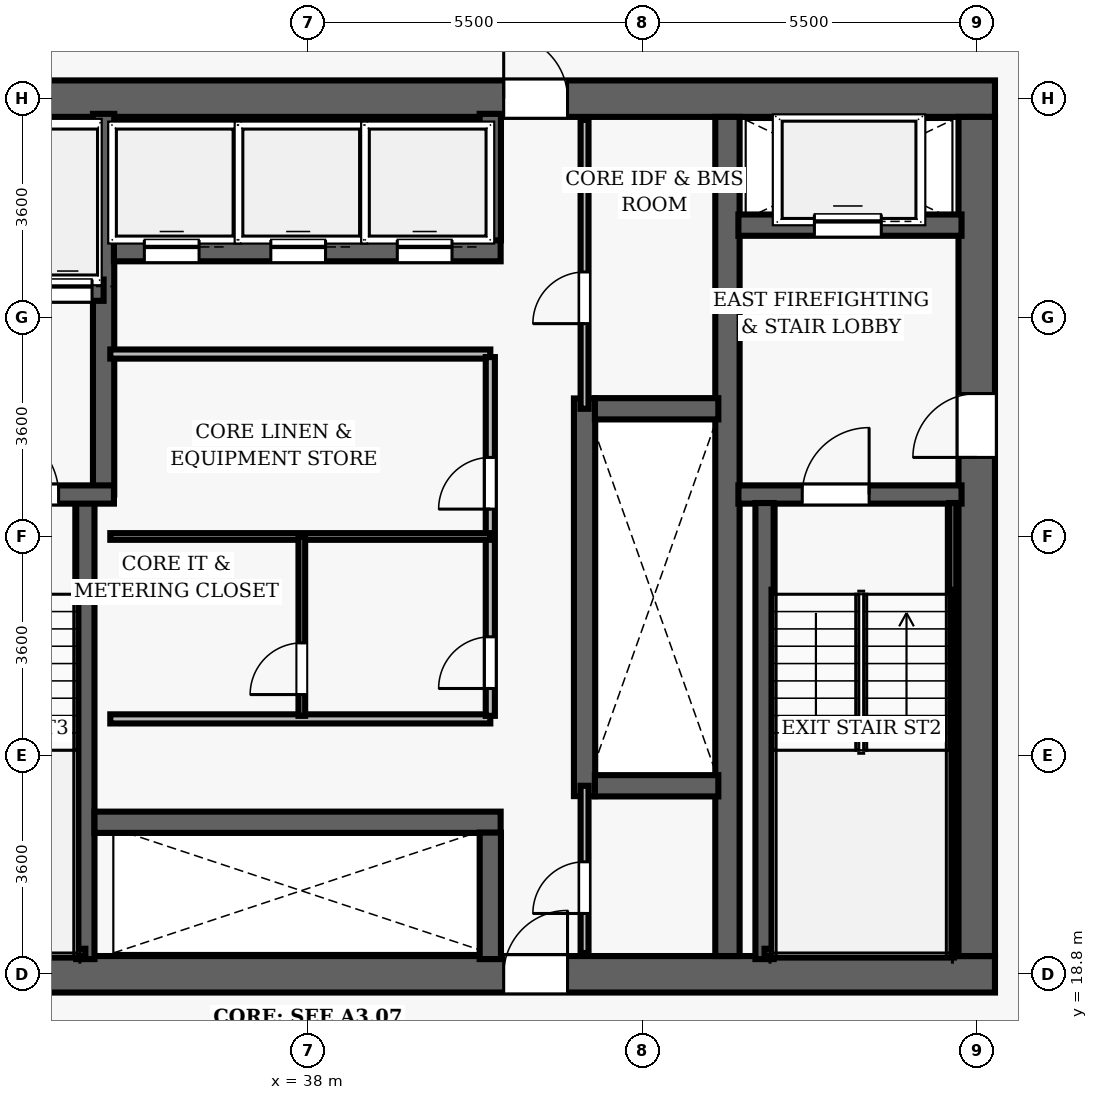
"""IFC4 building model, lengths in metres.
Left out: names, types, materials, properties, quantities, classifications, styles, units other than length and angle.
Written with IfcOpenShell. Run it as: python <this file> out.ifc"""

import sys

from ifc_helpers import new_model, si_unit, direction, frame, frame_2d, origin, place, context, subcontext, project, spatial, rectangle, extrude, element, fill, save


model = new_model("IFC4")
c1 = context("Model", 3, precision=1e-05, world=origin(), true_north=direction((0.0, 1.0)))
c2 = subcontext(c1, "Body", "Model", "MODEL_VIEW")
j1 = project(units=[si_unit("LENGTHUNIT", "METRE"), si_unit("PLANEANGLEUNIT", "RADIAN")], contexts=[c1])
p1 = place(None, origin())
s1 = spatial("IfcSite", under=j1, at=p1, CompositionType="ELEMENT")
p2 = place(p1, origin())
s2 = spatial("IfcBuilding", under=s1, at=p2, CompositionType="ELEMENT")
p3 = place(p2, frame((0.0, 0.0, 58.9)))
s3 = spatial("IfcBuildingStorey", under=s2, at=p3, CompositionType="ELEMENT", Elevation=58.9)
p4 = place(p3, frame((26.7, 18.8, 0.0), z_axis=(0.0, 0.0, 1.0), x_axis=(1.0, 0.0, 0.0)))
e1 = element("IfcWall", 1, at=p4, inside=s3, PredefinedType="SHEAR", context=c2, shape_type="SweptSolid", body=[
    extrude(rectangle(XDim=22.6, YDim=0.6, at=frame_2d((11.3, 0.0))), origin(), (0.0, 0.0, 1.0), 3.5),
])
p5 = place(p4, frame((14.52, 0.0, 0.0)))
e2 = element("IfcOpeningElement", 2, at=p5, cuts=e1, PredefinedType="OPENING", context=c2, shape_type="SweptSolid", body=[
    extrude(rectangle(XDim=1.05, YDim=2.15, at=frame_2d((0.525, 1.075))), frame((0.0, 0.31, 0.0), z_axis=(0.0, -1.0, 0.0), x_axis=(1.0, 0.0, 0.0)), (0.0, 0.0, 1.0), 0.62),
])
p6 = place(p3, frame((26.7, 33.2, 0.0), z_axis=(0.0, 0.0, 1.0), x_axis=(1.0, 0.0, 0.0)))
e3 = element("IfcWall", 3, at=p6, inside=s3, PredefinedType="SHEAR", context=c2, shape_type="SweptSolid", body=[
    extrude(rectangle(XDim=22.6, YDim=0.6, at=frame_2d((11.3, 0.0))), origin(), (0.0, 0.0, 1.0), 3.5),
])
p7 = place(p6, frame((4.62, 0.0, 0.0)))
e4 = element("IfcOpeningElement", 4, at=p7, cuts=e3, PredefinedType="OPENING", context=c2, shape_type="SweptSolid", body=[
    extrude(rectangle(XDim=1.05, YDim=2.15, at=frame_2d((0.525, 1.075))), frame((0.0, 0.31, 0.0), z_axis=(0.0, -1.0, 0.0), x_axis=(1.0, 0.0, 0.0)), (0.0, 0.0, 1.0), 0.62),
])
p8 = place(p6, frame((14.52, 0.0, 0.0)))
e5 = element("IfcOpeningElement", 5, at=p8, cuts=e3, PredefinedType="OPENING", context=c2, shape_type="SweptSolid", body=[
    extrude(rectangle(XDim=1.05, YDim=2.15, at=frame_2d((0.525, 1.075))), frame((0.0, 0.31, 0.0), z_axis=(0.0, -1.0, 0.0), x_axis=(1.0, 0.0, 0.0)), (0.0, 0.0, 1.0), 0.62),
])
p9 = place(p3, frame((49.0, 19.1, 0.0), z_axis=(0.0, 0.0, 1.0), x_axis=(0.0, 1.0, 0.0)))
e6 = element("IfcWall", 6, at=p9, inside=s3, PredefinedType="SHEAR", context=c2, shape_type="SweptSolid", body=[
    extrude(rectangle(XDim=13.8, YDim=0.6, at=frame_2d((6.9, 0.0))), origin(), (0.0, 0.0, 1.0), 3.5),
])
p10 = place(p9, frame((8.2, 0.0, 0.0)))
e7 = element("IfcOpeningElement", 7, at=p10, cuts=e6, PredefinedType="OPENING", context=c2, shape_type="SweptSolid", body=[
    extrude(rectangle(XDim=1.05, YDim=2.15, at=frame_2d((0.525, 1.075))), frame((0.0, 0.31, 0.0), z_axis=(0.0, -1.0, 0.0), x_axis=(1.0, 0.0, 0.0)), (0.0, 0.0, 1.0), 0.62),
])
p11 = place(p3, frame((44.9, 19.1, 0.0), z_axis=(0.0, 0.0, 1.0), x_axis=(0.0, 1.0, 0.0)))
e8 = element("IfcWall", 8, at=p11, inside=s3, PredefinedType="SHEAR", context=c2, shape_type="SweptSolid", body=[
    extrude(rectangle(XDim=13.8, YDim=0.4, at=frame_2d((6.9, 0.0))), origin(), (0.0, 0.0, 1.0), 3.5),
])
p12 = place(p3, frame((45.08, 26.69, 0.0), z_axis=(0.0, 0.0, 1.0), x_axis=(1.0, 0.0, 0.0)))
e9 = element("IfcWall", 9, at=p12, inside=s3, PredefinedType="SHEAR", context=c2, shape_type="SweptSolid", body=[
    extrude(rectangle(XDim=3.67, YDim=0.3, at=frame_2d((1.835, 0.0))), origin(), (0.0, 0.0, 1.0), 3.5),
])
p13 = place(p12, frame((1.05, 0.0, 0.0)))
e10 = element("IfcOpeningElement", 10, at=p13, cuts=e9, PredefinedType="OPENING", context=c2, shape_type="SweptSolid", body=[
    extrude(rectangle(XDim=1.1, YDim=2.15, at=frame_2d((0.55, 1.075))), frame((0.0, 0.16, 0.0), z_axis=(0.0, -1.0, 0.0), x_axis=(1.0, 0.0, 0.0)), (0.0, 0.0, 1.0), 0.32),
])
p14 = place(p3, frame((45.51, 19.05, 0.0), z_axis=(0.0, 0.0, 1.0), x_axis=(0.0, 1.0, 0.0)))
e11 = element("IfcWall", 11, at=p14, inside=s3, PredefinedType="SHEAR", context=c2, shape_type="SweptSolid", body=[
    extrude(rectangle(XDim=7.5, YDim=0.3, at=frame_2d((3.75, 0.0))), origin(), (0.0, 0.0, 1.0), 3.5),
])
p15 = place(p3, frame((48.605, 19.1, 0.0), z_axis=(0.0, 0.0, 1.0), x_axis=(0.0, 1.0, 0.0)))
e12 = element("IfcWall", 12, at=p15, inside=s3, PredefinedType="SHEAR", context=c2, shape_type="SweptSolid", body=[
    extrude(rectangle(XDim=7.45, YDim=0.12, at=frame_2d((3.725, 0.0))), origin(), (0.0, 0.0, 1.0), 3.5),
])
p16 = place(p3, frame((45.51, 19.16, 0.0), z_axis=(0.0, 0.0, 1.0), x_axis=(1.0, 0.0, 0.0)))
e13 = element("IfcWall", 13, at=p16, inside=s3, PredefinedType="SHEAR", context=c2, shape_type="SweptSolid", body=[
    extrude(rectangle(XDim=3.095, YDim=0.12, at=frame_2d((1.547, 0.0))), origin(), (0.0, 0.0, 1.0), 3.5),
])
p17 = place(p3, frame((45.08, 31.12, 0.0), z_axis=(0.0, 0.0, 1.0), x_axis=(1.0, 0.0, 0.0)))
e14 = element("IfcWall", 14, at=p17, inside=s3, PredefinedType="SHEAR", context=c2, shape_type="SweptSolid", body=[
    extrude(rectangle(XDim=3.67, YDim=0.35, at=frame_2d((1.835, 0.0))), origin(), (0.0, 0.0, 1.0), 2.6),
])
p18 = place(p17, frame((1.25, 0.0, 0.0)))
e15 = element("IfcOpeningElement", 15, at=p18, cuts=e14, PredefinedType="OPENING", context=c2, shape_type="SweptSolid", body=[
    extrude(rectangle(XDim=1.1, YDim=2.15, at=frame_2d((0.55, 1.075))), frame((0.0, 0.185, 0.0), z_axis=(0.0, -1.0, 0.0), x_axis=(1.0, 0.0, 0.0)), (0.0, 0.0, 1.0), 0.37),
])
p19 = place(p3, frame((34.34, 19.05, 0.0), z_axis=(0.0, 0.0, 1.0), x_axis=(0.0, 1.0, 0.0)))
e16 = element("IfcWall", 16, at=p19, inside=s3, PredefinedType="SHEAR", context=c2, shape_type="SweptSolid", body=[
    extrude(rectangle(XDim=7.5, YDim=0.3, at=frame_2d((3.75, 0.0))), origin(), (0.0, 0.0, 1.0), 3.5),
])
p20 = place(p3, frame((34.64, 26.69, 0.0), z_axis=(0.0, 0.0, 1.0), x_axis=(0.0, 1.0, 0.0)))
e17 = element("IfcWall", 17, at=p20, inside=s3, PredefinedType="SHEAR", context=c2, shape_type="SweptSolid", body=[
    extrude(rectangle(XDim=6.26, YDim=0.35, at=frame_2d((3.13, 0.0))), origin(), (0.0, 0.0, 1.0), 3.5),
])
p21 = place(p3, frame((31.25, 26.69, 0.0), z_axis=(0.0, 0.0, 1.0), x_axis=(1.0, 0.0, 0.0)))
e18 = element("IfcWall", 18, at=p21, inside=s3, PredefinedType="SHEAR", context=c2, shape_type="SweptSolid", body=[
    extrude(rectangle(XDim=3.56, YDim=0.3, at=frame_2d((1.78, 0.0))), origin(), (0.0, 0.0, 1.0), 3.5),
])
p22 = place(p21, frame((1.55, 0.0, 0.0)))
e19 = element("IfcOpeningElement", 19, at=p22, cuts=e18, PredefinedType="OPENING", context=c2, shape_type="SweptSolid", body=[
    extrude(rectangle(XDim=1.1, YDim=2.15, at=frame_2d((0.55, 1.075))), frame((0.0, 0.16, 0.0), z_axis=(0.0, -1.0, 0.0), x_axis=(1.0, 0.0, 0.0)), (0.0, 0.0, 1.0), 0.32),
])
p23 = place(p3, frame((31.3, 19.16, 0.0), z_axis=(0.0, 0.0, 1.0), x_axis=(1.0, 0.0, 0.0)))
e20 = element("IfcWall", 20, at=p23, inside=s3, PredefinedType="SHEAR", context=c2, shape_type="SweptSolid", body=[
    extrude(rectangle(XDim=3.04, YDim=0.12, at=frame_2d((1.52, 0.0))), origin(), (0.0, 0.0, 1.0), 3.5),
])
p24 = place(p3, frame((32.23, 30.05, 0.0), z_axis=(0.0, 0.0, 1.0), x_axis=(1.0, 0.0, 0.0)))
e21 = element("IfcWall", 21, at=p24, inside=s3, PredefinedType="SHEAR", context=c2, shape_type="SweptSolid", body=[
    extrude(rectangle(XDim=2.41, YDim=0.35, at=frame_2d((1.205, 0.0))), origin(), (0.0, 0.0, 1.0), 2.6),
])
p25 = place(p24, frame((0.42, 0.0, 0.0)))
e22 = element("IfcOpeningElement", 22, at=p25, cuts=e21, PredefinedType="OPENING", context=c2, shape_type="SweptSolid", body=[
    extrude(rectangle(XDim=0.8, YDim=2.15, at=frame_2d((0.4, 1.075))), frame((0.0, 0.185, 0.0), z_axis=(0.0, -1.0, 0.0), x_axis=(1.0, 0.0, 0.0)), (0.0, 0.0, 1.0), 0.37),
])
p26 = place(p24, frame((1.42, 0.0, 0.0)))
e23 = element("IfcOpeningElement", 23, at=p26, cuts=e21, PredefinedType="OPENING", context=c2, shape_type="SweptSolid", body=[
    extrude(rectangle(XDim=0.8, YDim=2.15, at=frame_2d((0.4, 1.075))), frame((0.0, 0.185, 0.0), z_axis=(0.0, -1.0, 0.0), x_axis=(1.0, 0.0, 0.0)), (0.0, 0.0, 1.0), 0.37),
])
p27 = place(p3, frame((42.55, 21.73, 0.0), z_axis=(0.0, 0.0, 1.0), x_axis=(0.0, 1.0, 0.0)))
e24 = element("IfcWall", 24, at=p27, inside=s3, PredefinedType="SHEAR", context=c2, shape_type="SweptSolid", body=[
    extrude(rectangle(XDim=6.54, YDim=0.35, at=frame_2d((3.27, 0.0))), origin(), (0.0, 0.0, 1.0), 2.6),
])
for number, where, z_axis, x_axis in (
    (25, (42.72, 21.9, 0.0), (0.0, 0.0, 1.0), (1.0, 0.0, 0.0)),
    (26, (42.72, 28.1, 0.0), (0.0, 0.0, 1.0), (1.0, 0.0, 0.0)),
):
    element("IfcWall", number, at=place(p3, frame(where, z_axis=z_axis, x_axis=x_axis)), inside=s3, PredefinedType="SHEAR", context=c2, shape_type="SweptSolid", body=[
        extrude(rectangle(XDim=2.03, YDim=0.35, at=frame_2d((1.015, 0.0))), origin(), (0.0, 0.0, 1.0), 2.6),
    ])
p28 = place(p3, frame((34.81, 30.7, 0.0), z_axis=(0.0, 0.0, 1.0), x_axis=(1.0, 0.0, 0.0)))
e27 = element("IfcWall", 27, at=p28, inside=s3, PredefinedType="SHEAR", context=c2, shape_type="SweptSolid", body=[
    extrude(rectangle(XDim=6.36, YDim=0.35, at=frame_2d((3.18, 0.0))), origin(), (0.0, 0.0, 1.0), 2.6),
])
p29 = place(p28, frame((0.5, 0.0, 0.0)))
e28 = element("IfcOpeningElement", 28, at=p29, cuts=e27, PredefinedType="OPENING", context=c2, shape_type="SweptSolid", body=[
    extrude(rectangle(XDim=0.9, YDim=2.15, at=frame_2d((0.45, 1.075))), frame((0.0, 0.185, 0.0), z_axis=(0.0, -1.0, 0.0), x_axis=(1.0, 0.0, 0.0)), (0.0, 0.0, 1.0), 0.37),
])
p30 = place(p28, frame((2.58, 0.0, 0.0)))
e29 = element("IfcOpeningElement", 29, at=p30, cuts=e27, PredefinedType="OPENING", context=c2, shape_type="SweptSolid", body=[
    extrude(rectangle(XDim=0.9, YDim=2.15, at=frame_2d((0.45, 1.075))), frame((0.0, 0.185, 0.0), z_axis=(0.0, -1.0, 0.0), x_axis=(1.0, 0.0, 0.0)), (0.0, 0.0, 1.0), 0.37),
])
p31 = place(p28, frame((4.66, 0.0, 0.0)))
e30 = element("IfcOpeningElement", 30, at=p31, cuts=e27, PredefinedType="OPENING", context=c2, shape_type="SweptSolid", body=[
    extrude(rectangle(XDim=0.9, YDim=2.15, at=frame_2d((0.45, 1.075))), frame((0.0, 0.185, 0.0), z_axis=(0.0, -1.0, 0.0), x_axis=(1.0, 0.0, 0.0)), (0.0, 0.0, 1.0), 0.37),
])
p32 = place(p3, frame((41.0, 30.87, 0.0), z_axis=(0.0, 0.0, 1.0), x_axis=(0.0, 1.0, 0.0)))
e31 = element("IfcWall", 31, at=p32, inside=s3, PredefinedType="SHEAR", context=c2, shape_type="SweptSolid", body=[
    extrude(rectangle(XDim=2.08, YDim=0.35, at=frame_2d((1.04, 0.0))), origin(), (0.0, 0.0, 1.0), 2.6),
])
p33 = place(p3, frame((34.49, 21.3, 0.0), z_axis=(0.0, 0.0, 1.0), x_axis=(1.0, 0.0, 0.0)))
e32 = element("IfcWall", 32, at=p33, inside=s3, PredefinedType="SHEAR", context=c2, shape_type="SweptSolid", body=[
    extrude(rectangle(XDim=6.68, YDim=0.35, at=frame_2d((3.34, 0.0))), origin(), (0.0, 0.0, 1.0), 2.6),
])
p34 = place(p3, frame((41.0, 19.05, 0.0), z_axis=(0.0, 0.0, 1.0), x_axis=(0.0, 1.0, 0.0)))
e33 = element("IfcWall", 33, at=p34, inside=s3, PredefinedType="SHEAR", context=c2, shape_type="SweptSolid", body=[
    extrude(rectangle(XDim=2.08, YDim=0.35, at=frame_2d((1.04, 0.0))), origin(), (0.0, 0.0, 1.0), 2.6),
])
for number, where, z_axis, x_axis in (
    (34, (34.75, 29.0, 0.0), (0.0, 0.0, 1.0), (1.0, 0.0, 0.0)),
    (35, (34.75, 23.0, 0.0), (0.0, 0.0, 1.0), (1.0, 0.0, 0.0)),
):
    element("IfcWall", number, at=place(p3, frame(where, z_axis=z_axis, x_axis=x_axis)), inside=s3, PredefinedType="PARTITIONING", context=c2, shape_type="SweptSolid", body=[
        extrude(rectangle(XDim=6.25, YDim=0.15, at=frame_2d((3.125, 0.0))), origin(), (0.0, 0.0, 1.0), 2.6),
    ])
p35 = place(p3, frame((41.0, 23.05, 0.0), z_axis=(0.0, 0.0, 1.0), x_axis=(0.0, 1.0, 0.0)))
e36 = element("IfcWall", 36, at=p35, inside=s3, PredefinedType="PARTITIONING", context=c2, shape_type="SweptSolid", body=[
    extrude(rectangle(XDim=5.9, YDim=0.15, at=frame_2d((2.95, 0.0))), origin(), (0.0, 0.0, 1.0), 2.6),
])
p36 = place(p35, frame((3.4, 0.0, 0.0)))
e37 = element("IfcOpeningElement", 37, at=p36, cuts=e36, PredefinedType="OPENING", context=c2, shape_type="SweptSolid", body=[
    extrude(rectangle(XDim=0.85, YDim=2.1, at=frame_2d((0.425, 1.05))), frame((0.0, 0.085, 0.0), z_axis=(0.0, -1.0, 0.0), x_axis=(1.0, 0.0, 0.0)), (0.0, 0.0, 1.0), 0.17),
])
p37 = place(p35, frame((0.45, 0.0, 0.0)))
e38 = element("IfcOpeningElement", 38, at=p37, cuts=e36, PredefinedType="OPENING", context=c2, shape_type="SweptSolid", body=[
    extrude(rectangle(XDim=0.85, YDim=2.1, at=frame_2d((0.425, 1.05))), frame((0.0, 0.085, 0.0), z_axis=(0.0, -1.0, 0.0), x_axis=(1.0, 0.0, 0.0)), (0.0, 0.0, 1.0), 0.17),
])
p38 = place(p3, frame((34.75, 26.0, 0.0), z_axis=(0.0, 0.0, 1.0), x_axis=(1.0, 0.0, 0.0)))
e39 = element("IfcWall", 39, at=p38, inside=s3, PredefinedType="PARTITIONING", context=c2, shape_type="SweptSolid", body=[
    extrude(rectangle(XDim=6.25, YDim=0.11, at=frame_2d((3.125, 0.0))), origin(), (0.0, 0.0, 1.0), 2.6),
])
p39 = place(p3, frame((37.9, 23.05, 0.0), z_axis=(0.0, 0.0, 1.0), x_axis=(0.0, 1.0, 0.0)))
e40 = element("IfcWall", 40, at=p39, inside=s3, PredefinedType="PARTITIONING", context=c2, shape_type="SweptSolid", body=[
    extrude(rectangle(XDim=2.95, YDim=0.11, at=frame_2d((1.475, 0.0))), origin(), (0.0, 0.0, 1.0), 2.6),
])
p40 = place(p39, frame((0.35, 0.0, 0.0)))
e41 = element("IfcOpeningElement", 41, at=p40, cuts=e40, PredefinedType="OPENING", context=c2, shape_type="SweptSolid", body=[
    extrude(rectangle(XDim=0.85, YDim=2.1, at=frame_2d((0.425, 1.05))), frame((0.0, 0.065, 0.0), z_axis=(0.0, -1.0, 0.0), x_axis=(1.0, 0.0, 0.0)), (0.0, 0.0, 1.0), 0.13),
])
p41 = place(p3, frame((42.55, 28.1, 0.0), z_axis=(0.0, 0.0, 1.0), x_axis=(0.0, 1.0, 0.0)))
e42 = element("IfcWall", 42, at=p41, inside=s3, PredefinedType="PARTITIONING", context=c2, shape_type="SweptSolid", body=[
    extrude(rectangle(XDim=4.75, YDim=0.13, at=frame_2d((2.375, 0.0))), origin(), (0.0, 0.0, 1.0), 2.6),
])
p42 = place(p41, frame((1.4, 0.0, 0.0)))
e43 = element("IfcOpeningElement", 43, at=p42, cuts=e42, PredefinedType="OPENING", context=c2, shape_type="SweptSolid", body=[
    extrude(rectangle(XDim=0.85, YDim=2.1, at=frame_2d((0.425, 1.05))), frame((0.0, 0.075, 0.0), z_axis=(0.0, -1.0, 0.0), x_axis=(1.0, 0.0, 0.0)), (0.0, 0.0, 1.0), 0.15),
])
p43 = place(p3, frame((42.55, 19.15, 0.0), z_axis=(0.0, 0.0, 1.0), x_axis=(0.0, 1.0, 0.0)))
e44 = element("IfcWall", 44, at=p43, inside=s3, PredefinedType="PARTITIONING", context=c2, shape_type="SweptSolid", body=[
    extrude(rectangle(XDim=2.75, YDim=0.13, at=frame_2d((1.375, 0.0))), origin(), (0.0, 0.0, 1.0), 2.6),
])
p44 = place(p43, frame((0.65, 0.0, 0.0)))
e45 = element("IfcOpeningElement", 45, at=p44, cuts=e44, PredefinedType="OPENING", context=c2, shape_type="SweptSolid", body=[
    extrude(rectangle(XDim=0.85, YDim=2.1, at=frame_2d((0.425, 1.05))), frame((0.0, 0.075, 0.0), z_axis=(0.0, -1.0, 0.0), x_axis=(1.0, 0.0, 0.0)), (0.0, 0.0, 1.0), 0.15),
])
p45 = place(p13, origin())
e46 = element("IfcDoor", 46, at=p45, inside=s3, OperationType="SINGLE_SWING_RIGHT", PredefinedType="DOOR", context=c2, shape_type="SweptSolid", body=[
    extrude(rectangle(XDim=1.1, YDim=2.15, at=frame_2d((0.55, 1.075))), frame((0.0, 0.025, 0.0), z_axis=(0.0, -1.0, 0.0), x_axis=(1.0, 0.0, 0.0)), (0.0, 0.0, 1.0), 0.05),
])
fill(e10, e46)
p46 = place(p10, origin())
e47 = element("IfcDoor", 47, at=p46, inside=s3, OperationType="SINGLE_SWING_LEFT", PredefinedType="DOOR", context=c2, shape_type="SweptSolid", body=[
    extrude(rectangle(XDim=1.05, YDim=2.15, at=frame_2d((0.525, 1.075))), frame((0.0, 0.025, 0.0), z_axis=(0.0, -1.0, 0.0), x_axis=(1.0, 0.0, 0.0)), (0.0, 0.0, 1.0), 0.05),
])
fill(e7, e47)
p47 = place(p22, origin())
e48 = element("IfcDoor", 48, at=p47, inside=s3, OperationType="SINGLE_SWING_LEFT", PredefinedType="DOOR", context=c2, shape_type="SweptSolid", body=[
    extrude(rectangle(XDim=1.1, YDim=2.15, at=frame_2d((0.55, 1.075))), frame((0.0, 0.025, 0.0), z_axis=(0.0, -1.0, 0.0), x_axis=(1.0, 0.0, 0.0)), (0.0, 0.0, 1.0), 0.05),
])
fill(e19, e48)
p48 = place(p8, origin())
e49 = element("IfcDoor", 49, at=p48, inside=s3, OperationType="SINGLE_SWING_LEFT", PredefinedType="DOOR", context=c2, shape_type="SweptSolid", body=[
    extrude(rectangle(XDim=1.05, YDim=2.15, at=frame_2d((0.525, 1.075))), frame((0.0, 0.025, 0.0), z_axis=(0.0, -1.0, 0.0), x_axis=(1.0, 0.0, 0.0)), (0.0, 0.0, 1.0), 0.05),
])
fill(e5, e49)
p49 = place(p5, origin())
e50 = element("IfcDoor", 50, at=p49, inside=s3, OperationType="SINGLE_SWING_RIGHT", PredefinedType="DOOR", context=c2, shape_type="SweptSolid", body=[
    extrude(rectangle(XDim=1.05, YDim=2.15, at=frame_2d((0.525, 1.075))), frame((0.0, 0.025, 0.0), z_axis=(0.0, -1.0, 0.0), x_axis=(1.0, 0.0, 0.0)), (0.0, 0.0, 1.0), 0.05),
])
fill(e2, e50)
p50 = place(p36, origin())
e51 = element("IfcDoor", 51, at=p50, inside=s3, OperationType="SINGLE_SWING_LEFT", PredefinedType="DOOR", context=c2, shape_type="SweptSolid", body=[
    extrude(rectangle(XDim=0.85, YDim=2.1, at=frame_2d((0.425, 1.05))), frame((0.0, 0.025, 0.0), z_axis=(0.0, -1.0, 0.0), x_axis=(1.0, 0.0, 0.0)), (0.0, 0.0, 1.0), 0.05),
])
fill(e37, e51)
p51 = place(p37, origin())
e52 = element("IfcDoor", 52, at=p51, inside=s3, OperationType="SINGLE_SWING_LEFT", PredefinedType="DOOR", context=c2, shape_type="SweptSolid", body=[
    extrude(rectangle(XDim=0.85, YDim=2.1, at=frame_2d((0.425, 1.05))), frame((0.0, 0.025, 0.0), z_axis=(0.0, -1.0, 0.0), x_axis=(1.0, 0.0, 0.0)), (0.0, 0.0, 1.0), 0.05),
])
fill(e38, e52)
p52 = place(p40, origin())
e53 = element("IfcDoor", 53, at=p52, inside=s3, OperationType="SINGLE_SWING_LEFT", PredefinedType="DOOR", context=c2, shape_type="SweptSolid", body=[
    extrude(rectangle(XDim=0.85, YDim=2.1, at=frame_2d((0.425, 1.05))), frame((0.0, 0.025, 0.0), z_axis=(0.0, -1.0, 0.0), x_axis=(1.0, 0.0, 0.0)), (0.0, 0.0, 1.0), 0.05),
])
fill(e41, e53)
p53 = place(p42, origin())
e54 = element("IfcDoor", 54, at=p53, inside=s3, OperationType="SINGLE_SWING_LEFT", PredefinedType="DOOR", context=c2, shape_type="SweptSolid", body=[
    extrude(rectangle(XDim=0.85, YDim=2.1, at=frame_2d((0.425, 1.05))), frame((0.0, 0.025, 0.0), z_axis=(0.0, -1.0, 0.0), x_axis=(1.0, 0.0, 0.0)), (0.0, 0.0, 1.0), 0.05),
])
fill(e43, e54)
p54 = place(p44, origin())
e55 = element("IfcDoor", 55, at=p54, inside=s3, OperationType="SINGLE_SWING_LEFT", PredefinedType="DOOR", context=c2, shape_type="SweptSolid", body=[
    extrude(rectangle(XDim=0.85, YDim=2.1, at=frame_2d((0.425, 1.05))), frame((0.0, 0.025, 0.0), z_axis=(0.0, -1.0, 0.0), x_axis=(1.0, 0.0, 0.0)), (0.0, 0.0, 1.0), 0.05),
])
fill(e45, e55)
p55 = place(p29, origin())
e56 = element("IfcDoor", 56, at=p55, inside=s3, OperationType="SLIDING_TO_LEFT", PredefinedType="DOOR", context=c2, shape_type="SweptSolid", body=[
    extrude(rectangle(XDim=0.9, YDim=2.15, at=frame_2d((0.45, 1.075))), frame((0.0, 0.025, 0.0), z_axis=(0.0, -1.0, 0.0), x_axis=(1.0, 0.0, 0.0)), (0.0, 0.0, 1.0), 0.05),
])
fill(e28, e56)
p56 = place(p30, origin())
e57 = element("IfcDoor", 57, at=p56, inside=s3, OperationType="SLIDING_TO_LEFT", PredefinedType="DOOR", context=c2, shape_type="SweptSolid", body=[
    extrude(rectangle(XDim=0.9, YDim=2.15, at=frame_2d((0.45, 1.075))), frame((0.0, 0.025, 0.0), z_axis=(0.0, -1.0, 0.0), x_axis=(1.0, 0.0, 0.0)), (0.0, 0.0, 1.0), 0.05),
])
fill(e29, e57)
p57 = place(p31, origin())
e58 = element("IfcDoor", 58, at=p57, inside=s3, OperationType="SLIDING_TO_LEFT", PredefinedType="DOOR", context=c2, shape_type="SweptSolid", body=[
    extrude(rectangle(XDim=0.9, YDim=2.15, at=frame_2d((0.45, 1.075))), frame((0.0, 0.025, 0.0), z_axis=(0.0, -1.0, 0.0), x_axis=(1.0, 0.0, 0.0)), (0.0, 0.0, 1.0), 0.05),
])
fill(e30, e58)
p58 = place(p18, origin())
e59 = element("IfcDoor", 59, at=p58, inside=s3, OperationType="SLIDING_TO_LEFT", PredefinedType="DOOR", context=c2, shape_type="SweptSolid", body=[
    extrude(rectangle(XDim=1.1, YDim=2.15, at=frame_2d((0.55, 1.075))), frame((0.0, 0.025, 0.0), z_axis=(0.0, -1.0, 0.0), x_axis=(1.0, 0.0, 0.0)), (0.0, 0.0, 1.0), 0.05),
])
fill(e15, e59)
p59 = place(p26, origin())
e60 = element("IfcDoor", 60, at=p59, inside=s3, OperationType="SLIDING_TO_LEFT", PredefinedType="DOOR", context=c2, shape_type="SweptSolid", body=[
    extrude(rectangle(XDim=0.8, YDim=2.15, at=frame_2d((0.4, 1.075))), frame((0.0, 0.025, 0.0), z_axis=(0.0, -1.0, 0.0), x_axis=(1.0, 0.0, 0.0)), (0.0, 0.0, 1.0), 0.05),
])
fill(e23, e60)
save(model, sys.argv[1])
